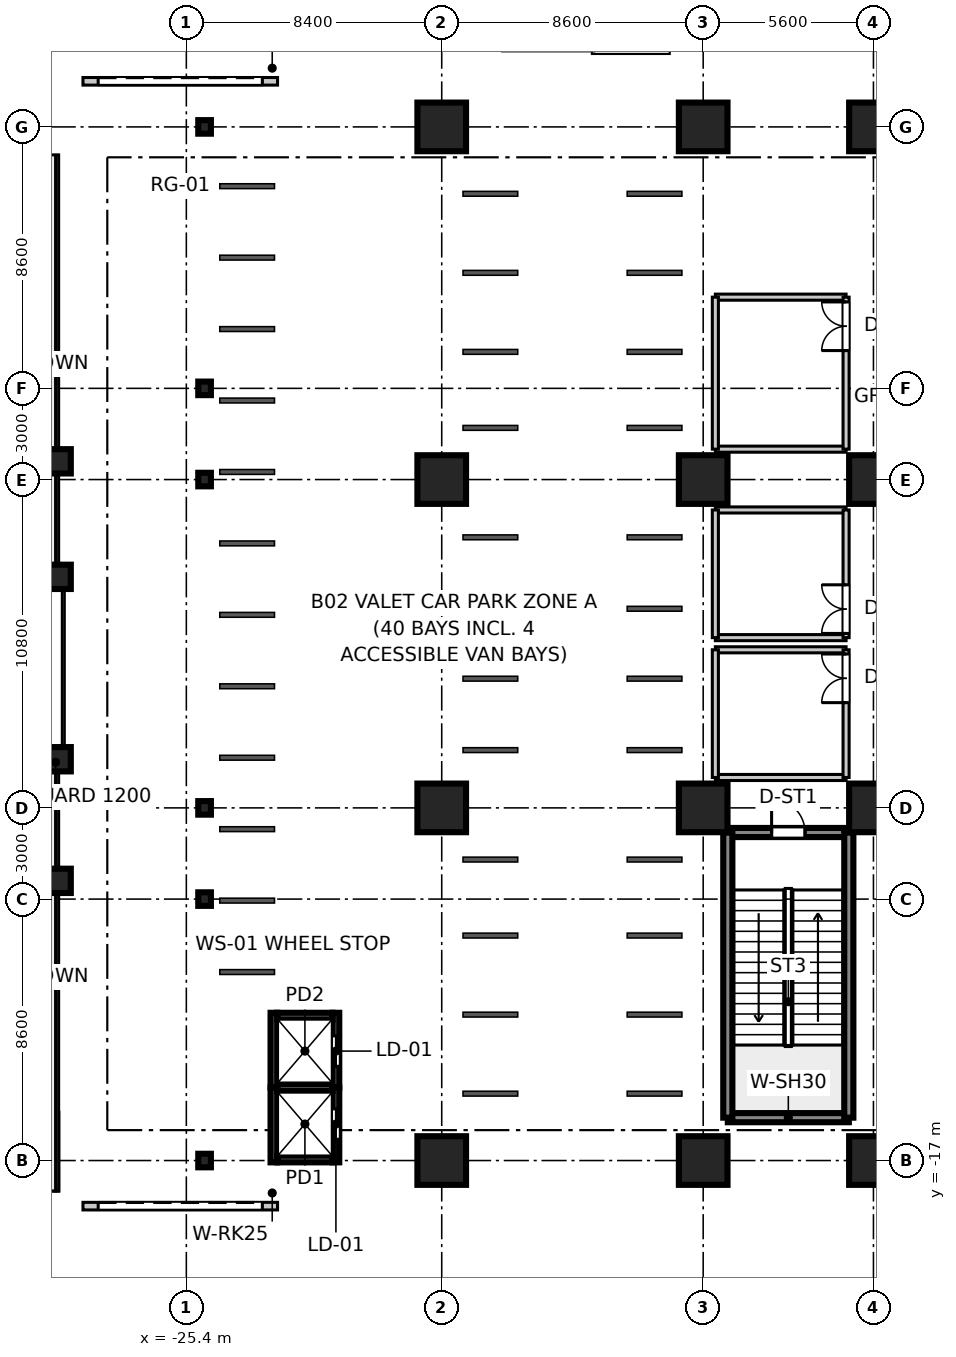
"""IFC4 building model, lengths in metres.
Left out: names, types, materials, properties, quantities, classifications, styles, units other than length and angle.
Written with IfcOpenShell. Run it as: python <this file> out.ifc"""

import sys

from ifc_helpers import new_model, si_unit, direction, frame, frame_2d, origin, origin_2d, place, context, subcontext, project, spatial, rectangle, i_section, extrude, source, transform, mapped, element, fill, save


model = new_model("IFC4")
c1 = context("Model", 3, precision=1e-05, world=origin(), true_north=direction((0.0, 1.0)))
c2 = subcontext(c1, "Body", "Model", "MODEL_VIEW")
j1 = project(units=[si_unit("LENGTHUNIT", "METRE"), si_unit("PLANEANGLEUNIT", "RADIAN")], contexts=[c1])
p1 = place(None, origin())
s1 = spatial("IfcSite", under=j1, at=p1, CompositionType="ELEMENT")
p2 = place(p1, origin())
s2 = spatial("IfcBuilding", under=s1, at=p2, CompositionType="ELEMENT")
p3 = place(p2, frame((0.0, 0.0, -10.8)))
s3 = spatial("IfcBuildingStorey", under=s2, at=p3, CompositionType="ELEMENT", Elevation=-10.8)
m1 = source(origin(), c2, "Body", "SweptSolid", [
    extrude(rectangle(XDim=1.6, YDim=1.6, at=origin_2d()), origin(), (0.0, 0.0, 1.0), 5.355),
])
for number, where, z_axis, x_axis in (
    (1, (-17.0, -17.0, 0.0), (0.0, 0.0, 1.0), (1.0, 0.0, 0.0)),
    (2, (-17.0, -5.4, 0.0), (0.0, 0.0, 1.0), (1.0, 0.0, 0.0)),
    (3, (-17.0, 5.4, 0.0), (0.0, 0.0, 1.0), (1.0, 0.0, 0.0)),
    (4, (-17.0, 17.0, 0.0), (0.0, 0.0, 1.0), (1.0, 0.0, 0.0)),
    (5, (-8.4, -17.0, 0.0), (0.0, 0.0, 1.0), (1.0, 0.0, 0.0)),
    (6, (-8.4, -5.4, 0.0), (0.0, 0.0, 1.0), (1.0, 0.0, 0.0)),
    (7, (-8.4, 5.4, 0.0), (0.0, 0.0, 1.0), (1.0, 0.0, 0.0)),
    (8, (-8.4, 17.0, 0.0), (0.0, 0.0, 1.0), (1.0, 0.0, 0.0)),
    (9, (-2.8, -17.0, 0.0), (0.0, 0.0, 1.0), (1.0, 0.0, 0.0)),
    (10, (-2.8, -5.4, 0.0), (0.0, 0.0, 1.0), (1.0, 0.0, 0.0)),
    (11, (-2.8, 5.4, 0.0), (0.0, 0.0, 1.0), (1.0, 0.0, 0.0)),
    (12, (-2.8, 17.0, 0.0), (0.0, 0.0, 1.0), (1.0, 0.0, 0.0)),
):
    element("IfcColumn", number, at=place(p3, frame(where, z_axis=z_axis, x_axis=x_axis)), inside=s3, PredefinedType="COLUMN", context=c2, shape_type="MappedRepresentation", body=[
        mapped(m1, transform((0.0, 0.0, 0.0), scale=1.0)),
    ])
m2 = source(origin(), c2, "Body", "SweptSolid", [
    extrude(rectangle(XDim=0.8, YDim=0.8, at=origin_2d()), origin(), (0.0, 0.0, 1.0), 5.355),
])
for number, where, z_axis, x_axis in (
    (13, (-29.6, -7.8, 0.0), (0.0, 0.0, 1.0), (1.0, 0.0, 0.0)),
    (14, (-29.6, -3.8, 0.0), (0.0, 0.0, 1.0), (1.0, 0.0, 0.0)),
    (15, (-29.6, 2.2, 0.0), (0.0, 0.0, 1.0), (1.0, 0.0, 0.0)),
    (16, (-29.6, 6.0, 0.0), (0.0, 0.0, 1.0), (1.0, 0.0, 0.0)),
):
    element("IfcColumn", number, at=place(p3, frame(where, z_axis=z_axis, x_axis=x_axis)), inside=s3, PredefinedType="COLUMN", context=c2, shape_type="MappedRepresentation", body=[
        mapped(m2, transform((0.0, 0.0, 0.0), scale=1.0)),
    ])
m3 = source(origin(), c2, "Body", "SweptSolid", [
    extrude(i_section(OverallWidth=0.416, OverallDepth=0.446, WebThickness=0.025, FlangeThickness=0.04, at=origin_2d()), origin(), (0.0, 0.0, 1.0), 5.355),
])
for number, where, z_axis, x_axis in (
    (17, (-24.8, -17.0, 0.0), (0.0, 0.0, 1.0), (1.0, 0.0, 0.0)),
    (18, (-24.8, -8.4, 0.0), (0.0, 0.0, 1.0), (1.0, 0.0, 0.0)),
    (19, (-24.8, -5.4, 0.0), (0.0, 0.0, 1.0), (1.0, 0.0, 0.0)),
    (20, (-24.8, 5.4, 0.0), (0.0, 0.0, 1.0), (1.0, 0.0, 0.0)),
    (21, (-24.8, 8.4, 0.0), (0.0, 0.0, 1.0), (1.0, 0.0, 0.0)),
    (22, (-24.8, 17.0, 0.0), (0.0, 0.0, 1.0), (1.0, 0.0, 0.0)),
):
    element("IfcColumn", number, at=place(p3, frame(where, z_axis=z_axis, x_axis=x_axis)), inside=s3, PredefinedType="COLUMN", context=c2, shape_type="MappedRepresentation", body=[
        mapped(m3, transform((0.0, 0.0, 0.0), scale=1.0)),
    ])
m4 = source(origin(), c2, "Body", "SweptSolid", [
    extrude(rectangle(XDim=3.98, YDim=0.3, at=frame_2d((1.99, 0.0))), origin(), (0.0, 0.0, 1.0), 5.05),
])
p4 = place(p3, frame((-7.59, -15.59, 0.0), z_axis=(0.0, 0.0, 1.0), x_axis=(1.0, 0.0, 0.0)))
e23 = element("IfcWall", 23, at=p4, inside=s3, PredefinedType="SHEAR", context=c2, shape_type="MappedRepresentation", body=[
    mapped(m4, transform((0.0, 0.0, 0.0), scale=1.0)),
])
p5 = place(p3, frame((-7.59, -6.21, 0.0), z_axis=(0.0, 0.0, 1.0), x_axis=(1.0, 0.0, 0.0)))
e24 = element("IfcWall", 24, at=p5, inside=s3, PredefinedType="SHEAR", context=c2, shape_type="MappedRepresentation", body=[
    mapped(m4, transform((0.0, 0.0, 0.0), scale=1.0)),
])
p6 = place(p5, frame((1.44, 0.0, 0.0)))
e25 = element("IfcOpeningElement", 25, at=p6, cuts=e24, PredefinedType="OPENING", context=c2, shape_type="SweptSolid", body=[
    extrude(rectangle(XDim=1.1, YDim=2.15, at=frame_2d((0.55, 1.075))), frame((0.0, 0.16, 0.0), z_axis=(0.0, -1.0, 0.0), x_axis=(1.0, 0.0, 0.0)), (0.0, 0.0, 1.0), 0.32),
])
m5 = source(origin(), c2, "Body", "SweptSolid", [
    extrude(rectangle(XDim=9.38, YDim=0.3, at=frame_2d((4.69, 0.0))), origin(), (0.0, 0.0, 1.0), 5.05),
])
for number, where, z_axis, x_axis in (
    (26, (-7.59, -15.59, 0.0), (0.0, 0.0, 1.0), (0.0, 1.0, 0.0)),
    (27, (-3.61, -15.59, 0.0), (0.0, 0.0, 1.0), (0.0, 1.0, 0.0)),
):
    element("IfcWall", number, at=place(p3, frame(where, z_axis=z_axis, x_axis=x_axis)), inside=s3, PredefinedType="SHEAR", context=c2, shape_type="MappedRepresentation", body=[
        mapped(m5, transform((0.0, 0.0, 0.0), scale=1.0)),
    ])
m6 = source(origin(), c2, "Body", "SweptSolid", [
    extrude(rectangle(XDim=2.46, YDim=0.22, at=frame_2d((1.23, 0.0))), origin(), (0.0, 0.0, 1.0), 5.05),
])
p7 = place(p3, frame((-22.52, -17.06, 0.0), z_axis=(0.0, 0.0, 1.0), x_axis=(0.0, 1.0, 0.0)))
e28 = element("IfcWall", 28, at=p7, inside=s3, PredefinedType="SHEAR", context=c2, shape_type="MappedRepresentation", body=[
    mapped(m6, transform((0.0, 0.0, 0.0), scale=1.0)),
])
p8 = place(p3, frame((-20.48, -17.06, 0.0), z_axis=(0.0, 0.0, 1.0), x_axis=(0.0, 1.0, 0.0)))
e29 = element("IfcWall", 29, at=p8, inside=s3, PredefinedType="SHEAR", context=c2, shape_type="MappedRepresentation", body=[
    mapped(m6, transform((0.0, 0.0, 0.0), scale=1.0)),
])
p9 = place(p8, frame((0.76, 0.0, 0.0)))
e30 = element("IfcOpeningElement", 30, at=p9, cuts=e29, PredefinedType="OPENING", context=c2, shape_type="SweptSolid", body=[
    extrude(rectangle(XDim=1.0, YDim=2.2, at=frame_2d((0.5, 1.1))), frame((0.0, 0.12, 0.0), z_axis=(0.0, -1.0, 0.0), x_axis=(1.0, 0.0, 0.0)), (0.0, 0.0, 1.0), 0.24),
])
m7 = source(origin(), c2, "Body", "SweptSolid", [
    extrude(rectangle(XDim=1.82, YDim=0.22, at=frame_2d((0.91, 0.0))), origin(), (0.0, 0.0, 1.0), 5.05),
])
p10 = place(p3, frame((-22.41, -16.95, 0.0), z_axis=(0.0, 0.0, 1.0), x_axis=(1.0, 0.0, 0.0)))
e31 = element("IfcWall", 31, at=p10, inside=s3, PredefinedType="SHEAR", context=c2, shape_type="MappedRepresentation", body=[
    mapped(m7, transform((0.0, 0.0, 0.0), scale=1.0)),
])
m8 = source(origin(), c2, "Body", "SweptSolid", [
    extrude(rectangle(XDim=1.82, YDim=0.22, at=frame_2d((0.91, 0.0))), origin(), (0.0, 0.0, 1.0), 5.4),
])
p11 = place(p3, frame((-22.41, -14.6, 0.0), z_axis=(0.0, 0.0, 1.0), x_axis=(1.0, 0.0, 0.0)))
e32 = element("IfcWall", 32, at=p11, inside=s3, PredefinedType="SHEAR", context=c2, shape_type="MappedRepresentation", body=[
    mapped(m8, transform((0.0, 0.0, 0.0), scale=1.0)),
])
m9 = source(origin(), c2, "Body", "SweptSolid", [
    extrude(rectangle(XDim=2.46, YDim=0.22, at=frame_2d((1.23, 0.0))), origin(), (0.0, 0.0, 1.0), 5.05),
])
p12 = place(p3, frame((-22.52, -14.6, 0.0), z_axis=(0.0, 0.0, 1.0), x_axis=(0.0, 1.0, 0.0)))
e33 = element("IfcWall", 33, at=p12, inside=s3, PredefinedType="SHEAR", context=c2, shape_type="MappedRepresentation", body=[
    mapped(m9, transform((0.0, 0.0, 0.0), scale=1.0)),
])
p13 = place(p3, frame((-20.48, -14.6, 0.0), z_axis=(0.0, 0.0, 1.0), x_axis=(0.0, 1.0, 0.0)))
e34 = element("IfcWall", 34, at=p13, inside=s3, PredefinedType="SHEAR", context=c2, shape_type="MappedRepresentation", body=[
    mapped(m9, transform((0.0, 0.0, 0.0), scale=1.0)),
])
p14 = place(p13, frame((0.7, 0.0, 0.0)))
e35 = element("IfcOpeningElement", 35, at=p14, cuts=e34, PredefinedType="OPENING", context=c2, shape_type="SweptSolid", body=[
    extrude(rectangle(XDim=1.0, YDim=2.2, at=frame_2d((0.5, 1.1))), frame((0.0, 0.12, 0.0), z_axis=(0.0, -1.0, 0.0), x_axis=(1.0, 0.0, 0.0)), (0.0, 0.0, 1.0), 0.24),
])
p15 = place(p3, frame((-22.41, -12.25, 0.0), z_axis=(0.0, 0.0, 1.0), x_axis=(1.0, 0.0, 0.0)))
e36 = element("IfcWall", 36, at=p15, inside=s3, PredefinedType="SHEAR", context=c2, shape_type="MappedRepresentation", body=[
    mapped(m7, transform((0.0, 0.0, 0.0), scale=1.0)),
])
m10 = source(origin(), c2, "Body", "SweptSolid", [
    extrude(rectangle(XDim=6.4, YDim=0.25, at=frame_2d((3.2, 0.0))), origin(), (0.0, 0.0, 1.0), 4.95),
])
p16 = place(p3, frame((-28.8, -18.5, 0.0), z_axis=(0.0, 0.0, 1.0), x_axis=(1.0, 0.0, 0.0)))
e37 = element("IfcWall", 37, at=p16, inside=s3, PredefinedType="PARTITIONING", context=c2, shape_type="MappedRepresentation", body=[
    mapped(m10, transform((0.0, 0.0, 0.0), scale=1.0)),
])
p17 = place(p16, frame((0.5, 0.0, 0.0)))
e38 = element("IfcOpeningElement", 38, at=p17, cuts=e37, PredefinedType="OPENING", context=c2, shape_type="SweptSolid", body=[
    extrude(rectangle(XDim=5.4, YDim=3.1, at=frame_2d((2.7, 1.55))), frame((0.0, 0.135, 0.0), z_axis=(0.0, -1.0, 0.0), x_axis=(1.0, 0.0, 0.0)), (0.0, 0.0, 1.0), 0.27),
])
p18 = place(p3, frame((-28.8, 18.5, 0.0), z_axis=(0.0, 0.0, 1.0), x_axis=(1.0, 0.0, 0.0)))
e39 = element("IfcWall", 39, at=p18, inside=s3, PredefinedType="PARTITIONING", context=c2, shape_type="MappedRepresentation", body=[
    mapped(m10, transform((0.0, 0.0, 0.0), scale=1.0)),
])
p19 = place(p18, frame((0.5, 0.0, 0.0)))
e40 = element("IfcOpeningElement", 40, at=p19, cuts=e39, PredefinedType="OPENING", context=c2, shape_type="SweptSolid", body=[
    extrude(rectangle(XDim=5.4, YDim=3.1, at=frame_2d((2.7, 1.55))), frame((0.0, 0.135, 0.0), z_axis=(0.0, -1.0, 0.0), x_axis=(1.0, 0.0, 0.0)), (0.0, 0.0, 1.0), 0.27),
])
m11 = source(origin(), c2, "Body", "SweptSolid", [
    extrude(rectangle(XDim=4.3, YDim=0.2, at=frame_2d((2.15, 0.0))), origin(), (0.0, 0.0, 1.0), 3.4),
])
for number, where, z_axis, x_axis in (
    (41, (-8.0, -4.4, 0.0), (0.0, 0.0, 1.0), (1.0, 0.0, 0.0)),
    (42, (-8.0, -0.2, 0.0), (0.0, 0.0, 1.0), (1.0, 0.0, 0.0)),
):
    element("IfcWall", number, at=place(p3, frame(where, z_axis=z_axis, x_axis=x_axis)), inside=s3, PredefinedType="PARTITIONING", context=c2, shape_type="MappedRepresentation", body=[
        mapped(m11, transform((0.0, 0.0, 0.0), scale=1.0)),
    ])
m12 = source(origin(), c2, "Body", "SweptSolid", [
    extrude(rectangle(XDim=4.2, YDim=0.2, at=frame_2d((2.1, 0.0))), origin(), (0.0, 0.0, 1.0), 3.4),
])
p20 = place(p3, frame((-8.0, -4.4, 0.0), z_axis=(0.0, 0.0, 1.0), x_axis=(0.0, 1.0, 0.0)))
e43 = element("IfcWall", 43, at=p20, inside=s3, PredefinedType="PARTITIONING", context=c2, shape_type="MappedRepresentation", body=[
    mapped(m12, transform((0.0, 0.0, 0.0), scale=1.0)),
])
p21 = place(p3, frame((-3.7, -4.4, 0.0), z_axis=(0.0, 0.0, 1.0), x_axis=(0.0, 1.0, 0.0)))
e44 = element("IfcWall", 44, at=p21, inside=s3, PredefinedType="PARTITIONING", context=c2, shape_type="MappedRepresentation", body=[
    mapped(m12, transform((0.0, 0.0, 0.0), scale=1.0)),
])
p22 = place(p21, frame((2.462, 0.0, 0.0)))
e45 = element("IfcOpeningElement", 45, at=p22, cuts=e44, PredefinedType="OPENING", context=c2, shape_type="SweptSolid", body=[
    extrude(rectangle(XDim=1.6, YDim=2.15, at=frame_2d((0.8, 1.075))), frame((0.0, 0.11, 0.0), z_axis=(0.0, -1.0, 0.0), x_axis=(1.0, 0.0, 0.0)), (0.0, 0.0, 1.0), 0.22),
])
for number, where, z_axis, x_axis in (
    (46, (-8.0, 0.2, 0.0), (0.0, 0.0, 1.0), (1.0, 0.0, 0.0)),
    (47, (-8.0, 4.4, 0.0), (0.0, 0.0, 1.0), (1.0, 0.0, 0.0)),
):
    element("IfcWall", number, at=place(p3, frame(where, z_axis=z_axis, x_axis=x_axis)), inside=s3, PredefinedType="PARTITIONING", context=c2, shape_type="MappedRepresentation", body=[
        mapped(m11, transform((0.0, 0.0, 0.0), scale=1.0)),
    ])
p23 = place(p3, frame((-8.0, 0.2, 0.0), z_axis=(0.0, 0.0, 1.0), x_axis=(0.0, 1.0, 0.0)))
e48 = element("IfcWall", 48, at=p23, inside=s3, PredefinedType="PARTITIONING", context=c2, shape_type="MappedRepresentation", body=[
    mapped(m12, transform((0.0, 0.0, 0.0), scale=1.0)),
])
p24 = place(p3, frame((-3.7, 0.2, 0.0), z_axis=(0.0, 0.0, 1.0), x_axis=(0.0, 1.0, 0.0)))
e49 = element("IfcWall", 49, at=p24, inside=s3, PredefinedType="PARTITIONING", context=c2, shape_type="MappedRepresentation", body=[
    mapped(m12, transform((0.0, 0.0, 0.0), scale=1.0)),
])
p25 = place(p24, frame((0.138, 0.0, 0.0)))
e50 = element("IfcOpeningElement", 50, at=p25, cuts=e49, PredefinedType="OPENING", context=c2, shape_type="SweptSolid", body=[
    extrude(rectangle(XDim=1.6, YDim=2.15, at=frame_2d((0.8, 1.075))), frame((0.0, 0.11, 0.0), z_axis=(0.0, -1.0, 0.0), x_axis=(1.0, 0.0, 0.0)), (0.0, 0.0, 1.0), 0.22),
])
for number, where, z_axis, x_axis in (
    (51, (-8.0, 6.4, 0.0), (0.0, 0.0, 1.0), (1.0, 0.0, 0.0)),
    (52, (-8.0, 11.4, 0.0), (0.0, 0.0, 1.0), (1.0, 0.0, 0.0)),
):
    element("IfcWall", number, at=place(p3, frame(where, z_axis=z_axis, x_axis=x_axis)), inside=s3, PredefinedType="PARTITIONING", context=c2, shape_type="MappedRepresentation", body=[
        mapped(m11, transform((0.0, 0.0, 0.0), scale=1.0)),
    ])
m13 = source(origin(), c2, "Body", "SweptSolid", [
    extrude(rectangle(XDim=5.0, YDim=0.2, at=frame_2d((2.5, 0.0))), origin(), (0.0, 0.0, 1.0), 3.4),
])
p26 = place(p3, frame((-8.0, 6.4, 0.0), z_axis=(0.0, 0.0, 1.0), x_axis=(0.0, 1.0, 0.0)))
e53 = element("IfcWall", 53, at=p26, inside=s3, PredefinedType="PARTITIONING", context=c2, shape_type="MappedRepresentation", body=[
    mapped(m13, transform((0.0, 0.0, 0.0), scale=1.0)),
])
p27 = place(p3, frame((-3.7, 6.4, 0.0), z_axis=(0.0, 0.0, 1.0), x_axis=(0.0, 1.0, 0.0)))
e54 = element("IfcWall", 54, at=p27, inside=s3, PredefinedType="PARTITIONING", context=c2, shape_type="MappedRepresentation", body=[
    mapped(m13, transform((0.0, 0.0, 0.0), scale=1.0)),
])
p28 = place(p27, frame((3.243, 0.0, 0.0)))
e55 = element("IfcOpeningElement", 55, at=p28, cuts=e54, PredefinedType="OPENING", context=c2, shape_type="SweptSolid", body=[
    extrude(rectangle(XDim=1.6, YDim=2.15, at=frame_2d((0.8, 1.075))), frame((0.0, 0.11, 0.0), z_axis=(0.0, -1.0, 0.0), x_axis=(1.0, 0.0, 0.0)), (0.0, 0.0, 1.0), 0.22),
])
m14 = source(origin(), c2, "Body", "SweptSolid", [
    extrude(rectangle(XDim=1.1, YDim=2.15, at=frame_2d((0.55, 1.075))), frame((0.0, 0.025, 0.0), z_axis=(0.0, -1.0, 0.0), x_axis=(1.0, 0.0, 0.0)), (0.0, 0.0, 1.0), 0.05),
])
p29 = place(p6, frame((1.1, 0.0, 0.0), z_axis=(0.0, 0.0, 1.0), x_axis=(-1.0, 0.0, 0.0)))
e56 = element("IfcDoor", 56, at=p29, inside=s3, OperationType="SINGLE_SWING_LEFT", PredefinedType="DOOR", context=c2, shape_type="MappedRepresentation", body=[
    mapped(m14, transform((0.0, 0.0, 0.0), scale=1.0)),
])
fill(e25, e56)
m15 = source(origin(), c2, "Body", "SweptSolid", [
    extrude(rectangle(XDim=1.0, YDim=2.2, at=frame_2d((0.5, 1.1))), frame((0.0, 0.025, 0.0), z_axis=(0.0, -1.0, 0.0), x_axis=(1.0, 0.0, 0.0)), (0.0, 0.0, 1.0), 0.05),
])
p30 = place(p9, frame((1.0, 0.0, 0.0), z_axis=(0.0, 0.0, 1.0), x_axis=(-1.0, 0.0, 0.0)))
e57 = element("IfcDoor", 57, at=p30, inside=s3, OperationType="DOUBLE_DOOR_SLIDING", PredefinedType="DOOR", context=c2, shape_type="MappedRepresentation", body=[
    mapped(m15, transform((0.0, 0.0, 0.0), scale=1.0)),
])
fill(e30, e57)
p31 = place(p14, frame((1.0, 0.0, 0.0), z_axis=(0.0, 0.0, 1.0), x_axis=(-1.0, 0.0, 0.0)))
e58 = element("IfcDoor", 58, at=p31, inside=s3, OperationType="DOUBLE_DOOR_SLIDING", PredefinedType="DOOR", context=c2, shape_type="MappedRepresentation", body=[
    mapped(m15, transform((0.0, 0.0, 0.0), scale=1.0)),
])
fill(e35, e58)
m16 = source(origin(), c2, "Body", "SweptSolid", [
    extrude(rectangle(XDim=5.4, YDim=3.1, at=frame_2d((2.7, 1.55))), frame((0.0, 0.025, 0.0), z_axis=(0.0, -1.0, 0.0), x_axis=(1.0, 0.0, 0.0)), (0.0, 0.0, 1.0), 0.05),
])
p32 = place(p17, origin())
e59 = element("IfcDoor", 59, at=p32, inside=s3, OperationType="ROLLINGUP", PredefinedType="GATE", context=c2, shape_type="MappedRepresentation", body=[
    mapped(m16, transform((0.0, 0.0, 0.0), scale=1.0)),
])
fill(e38, e59)
p33 = place(p19, origin())
e60 = element("IfcDoor", 60, at=p33, inside=s3, OperationType="ROLLINGUP", PredefinedType="GATE", context=c2, shape_type="MappedRepresentation", body=[
    mapped(m16, transform((0.0, 0.0, 0.0), scale=1.0)),
])
fill(e40, e60)
m17 = source(origin(), c2, "Body", "SweptSolid", [
    extrude(rectangle(XDim=1.6, YDim=2.15, at=frame_2d((0.8, 1.075))), frame((0.0, 0.025, 0.0), z_axis=(0.0, -1.0, 0.0), x_axis=(1.0, 0.0, 0.0)), (0.0, 0.0, 1.0), 0.05),
])
p34 = place(p22, origin())
e61 = element("IfcDoor", 61, at=p34, inside=s3, OperationType="DOUBLE_DOOR_SINGLE_SWING", PredefinedType="DOOR", context=c2, shape_type="MappedRepresentation", body=[
    mapped(m17, transform((0.0, 0.0, 0.0), scale=1.0)),
])
fill(e45, e61)
p35 = place(p25, origin())
e62 = element("IfcDoor", 62, at=p35, inside=s3, OperationType="DOUBLE_DOOR_SINGLE_SWING", PredefinedType="DOOR", context=c2, shape_type="MappedRepresentation", body=[
    mapped(m17, transform((0.0, 0.0, 0.0), scale=1.0)),
])
fill(e50, e62)
p36 = place(p28, origin())
e63 = element("IfcDoor", 63, at=p36, inside=s3, OperationType="DOUBLE_DOOR_SINGLE_SWING", PredefinedType="DOOR", context=c2, shape_type="MappedRepresentation", body=[
    mapped(m17, transform((0.0, 0.0, 0.0), scale=1.0)),
])
fill(e55, e63)
save(model, sys.argv[1])
